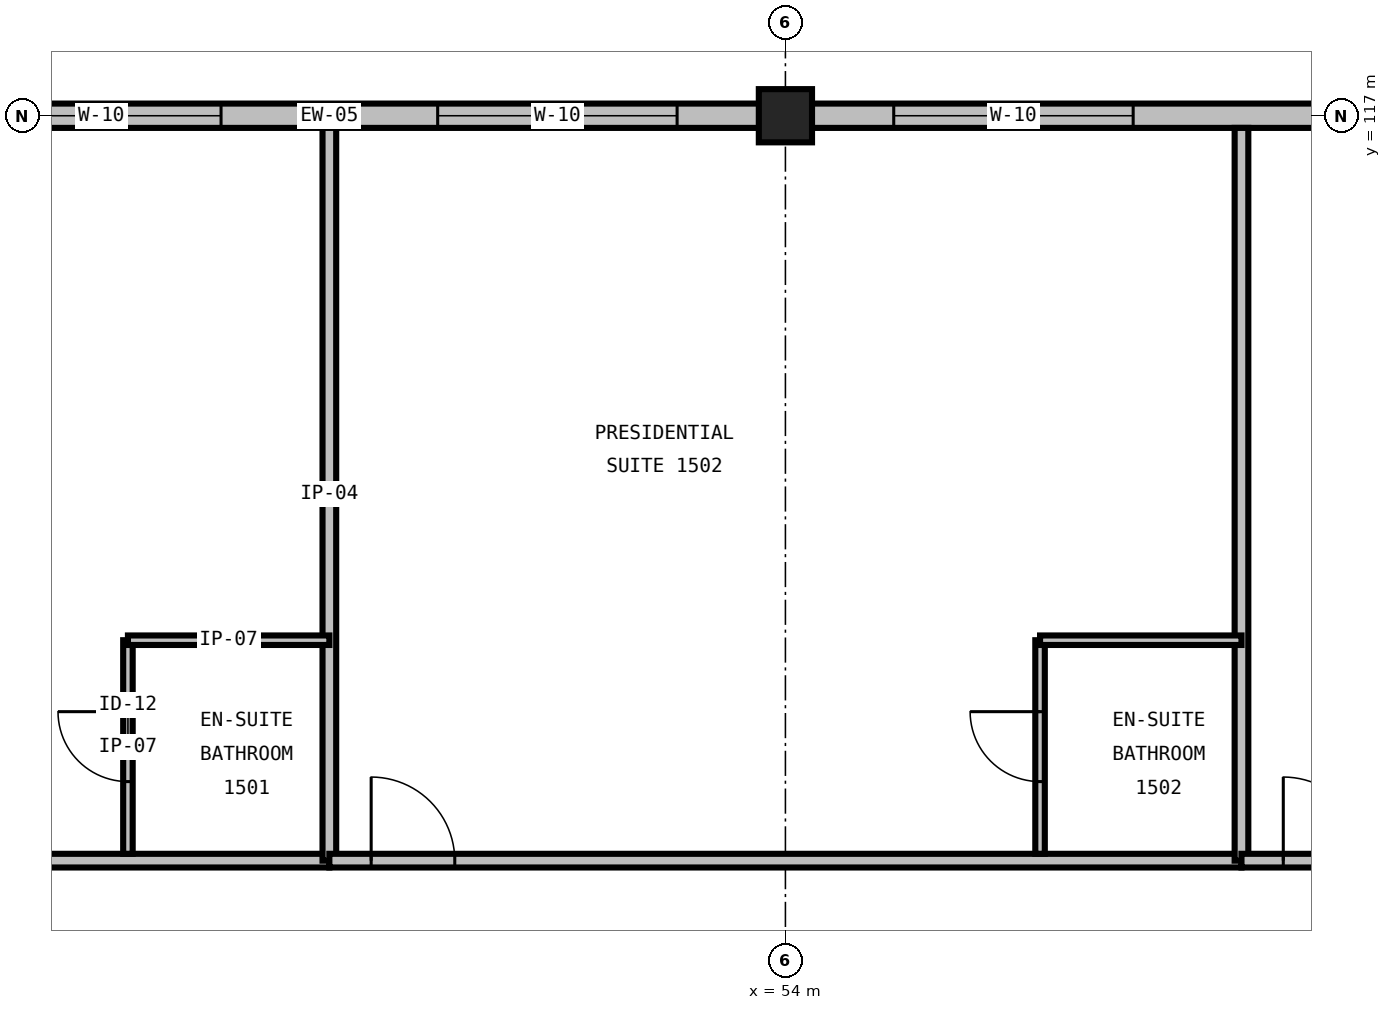
"""IFC4 building model, lengths in metres.
Left out: names, types, materials, properties, quantities, classifications, styles, units other than length and angle.
Written with IfcOpenShell. Run it as: python <this file> out.ifc"""

import sys

from ifc_helpers import new_model, si_unit, direction, frame, frame_2d, origin, origin_2d, place, context, subcontext, project, spatial, rectangle, extrude, element, fill, save


model = new_model("IFC4")
c1 = context("Model", 3, precision=1e-05, world=origin(), true_north=direction((0.0, 1.0)))
c2 = subcontext(c1, "Body", "Model", "MODEL_VIEW")
j1 = project(units=[si_unit("LENGTHUNIT", "METRE"), si_unit("PLANEANGLEUNIT", "RADIAN")], contexts=[c1])
p1 = place(None, origin())
s1 = spatial("IfcSite", under=j1, at=p1, CompositionType="ELEMENT")
p2 = place(p1, origin())
s2 = spatial("IfcBuilding", under=s1, at=p2, CompositionType="ELEMENT")
p3 = place(p2, frame((0.0, 0.0, 63.6)))
s3 = spatial("IfcBuildingStorey", under=s2, at=p3, CompositionType="ELEMENT", Elevation=63.6)
p4 = place(p3, frame((54.0, 117.0, 0.0), z_axis=(0.0, 0.0, 1.0), x_axis=(1.0, 0.0, 0.0)))
e1 = element("IfcColumn", 1, at=p4, inside=s3, PredefinedType="COLUMN", context=c2, shape_type="SweptSolid", body=[
    extrude(rectangle(XDim=0.7, YDim=0.7, at=origin_2d()), origin(), (0.0, 0.0, 1.0), 3.6),
])
p5 = place(p3, frame((54.0, 117.0, 0.0), z_axis=(0.0, 0.0, 1.0), x_axis=(-1.0, 0.0, 0.0)))
e2 = element("IfcWall", 2, at=p5, inside=s3, PredefinedType="STANDARD", context=c2, shape_type="SweptSolid", body=[
    extrude(rectangle(XDim=12.0, YDim=0.32, at=frame_2d((6.0, 0.0))), origin(), (0.0, 0.0, 1.0), 2.536),
])
p6 = place(p5, frame((1.425, 0.0, 0.65)))
e3 = element("IfcOpeningElement", 3, at=p6, cuts=e2, PredefinedType="OPENING", context=c2, shape_type="SweptSolid", body=[
    extrude(rectangle(XDim=3.15, YDim=1.75, at=frame_2d((1.575, 0.875))), frame((0.0, 0.175, 0.0), z_axis=(0.0, -1.0, 0.0), x_axis=(1.0, 0.0, 0.0)), (0.0, 0.0, 1.0), 0.35),
])
p7 = place(p5, frame((7.425, 0.0, 0.65)))
e4 = element("IfcOpeningElement", 4, at=p7, cuts=e2, PredefinedType="OPENING", context=c2, shape_type="SweptSolid", body=[
    extrude(rectangle(XDim=3.15, YDim=1.75, at=frame_2d((1.575, 0.875))), frame((0.0, 0.175, 0.0), z_axis=(0.0, -1.0, 0.0), x_axis=(1.0, 0.0, 0.0)), (0.0, 0.0, 1.0), 0.35),
])
p8 = place(p3, frame((66.0, 117.0, 0.0), z_axis=(0.0, 0.0, 1.0), x_axis=(-1.0, 0.0, 0.0)))
e5 = element("IfcWall", 5, at=p8, inside=s3, PredefinedType="STANDARD", context=c2, shape_type="SweptSolid", body=[
    extrude(rectangle(XDim=12.0, YDim=0.32, at=frame_2d((6.0, 0.0))), origin(), (0.0, 0.0, 1.0), 2.536),
])
p9 = place(p8, frame((1.425, 0.0, 0.65)))
e6 = element("IfcOpeningElement", 6, at=p9, cuts=e5, PredefinedType="OPENING", context=c2, shape_type="SweptSolid", body=[
    extrude(rectangle(XDim=3.15, YDim=1.75, at=frame_2d((1.575, 0.875))), frame((0.0, 0.175, 0.0), z_axis=(0.0, -1.0, 0.0), x_axis=(1.0, 0.0, 0.0)), (0.0, 0.0, 1.0), 0.35),
])
p10 = place(p8, frame((7.425, 0.0, 0.65)))
e7 = element("IfcOpeningElement", 7, at=p10, cuts=e5, PredefinedType="OPENING", context=c2, shape_type="SweptSolid", body=[
    extrude(rectangle(XDim=3.15, YDim=1.75, at=frame_2d((1.575, 0.875))), frame((0.0, 0.175, 0.0), z_axis=(0.0, -1.0, 0.0), x_axis=(1.0, 0.0, 0.0)), (0.0, 0.0, 1.0), 0.35),
])
p11 = place(p3, frame((36.085, 107.2, 0.0), z_axis=(0.0, 0.0, 1.0), x_axis=(1.0, 0.0, 0.0)))
e8 = element("IfcWall", 8, at=p11, inside=s3, PredefinedType="PARTITIONING", context=c2, shape_type="SweptSolid", body=[
    extrude(rectangle(XDim=11.915, YDim=0.18, at=frame_2d((5.957, 0.0))), origin(), (0.0, 0.0, 1.0), 3.29),
])
p12 = place(p11, frame((0.55, 0.0, 0.0)))
e9 = element("IfcOpeningElement", 9, at=p12, cuts=e8, PredefinedType="OPENING", context=c2, shape_type="SweptSolid", body=[
    extrude(rectangle(XDim=1.1, YDim=2.2, at=frame_2d((0.55, 1.1))), frame((0.0, 0.105, 0.0), z_axis=(0.0, -1.0, 0.0), x_axis=(1.0, 0.0, 0.0)), (0.0, 0.0, 1.0), 0.21),
])
p13 = place(p3, frame((48.0, 107.2, 0.0), z_axis=(0.0, 0.0, 1.0), x_axis=(0.0, 1.0, 0.0)))
e10 = element("IfcWall", 10, at=p13, inside=s3, PredefinedType="PARTITIONING", context=c2, shape_type="SweptSolid", body=[
    extrude(rectangle(XDim=9.64, YDim=0.18, at=frame_2d((4.82, 0.0))), origin(), (0.0, 0.0, 1.0), 3.29),
])
p14 = place(p3, frame((45.35, 107.29, 0.0), z_axis=(0.0, 0.0, 1.0), x_axis=(0.0, 1.0, 0.0)))
e11 = element("IfcWall", 11, at=p14, inside=s3, PredefinedType="PARTITIONING", context=c2, shape_type="SweptSolid", body=[
    extrude(rectangle(XDim=2.81, YDim=0.125, at=frame_2d((1.405, 0.0))), origin(), (0.0, 0.0, 1.0), 3.29),
])
p15 = place(p14, frame((0.95, 0.0, 0.0)))
e12 = element("IfcOpeningElement", 12, at=p15, cuts=e11, PredefinedType="OPENING", context=c2, shape_type="SweptSolid", body=[
    extrude(rectangle(XDim=0.92, YDim=2.1, at=frame_2d((0.46, 1.05))), frame((0.0, 0.077, 0.0), z_axis=(0.0, -1.0, 0.0), x_axis=(1.0, 0.0, 0.0)), (0.0, 0.0, 1.0), 0.155),
])
p16 = place(p3, frame((45.35, 110.1, 0.0), z_axis=(0.0, 0.0, 1.0), x_axis=(1.0, 0.0, 0.0)))
e13 = element("IfcWall", 13, at=p16, inside=s3, PredefinedType="PARTITIONING", context=c2, shape_type="SweptSolid", body=[
    extrude(rectangle(XDim=2.65, YDim=0.125, at=frame_2d((1.325, 0.0))), origin(), (0.0, 0.0, 1.0), 3.29),
])
p17 = place(p3, frame((48.0, 107.2, 0.0), z_axis=(0.0, 0.0, 1.0), x_axis=(1.0, 0.0, 0.0)))
e14 = element("IfcWall", 14, at=p17, inside=s3, PredefinedType="PARTITIONING", context=c2, shape_type="SweptSolid", body=[
    extrude(rectangle(XDim=12.0, YDim=0.18, at=frame_2d((6.0, 0.0))), origin(), (0.0, 0.0, 1.0), 3.29),
])
p18 = place(p17, frame((0.55, 0.0, 0.0)))
e15 = element("IfcOpeningElement", 15, at=p18, cuts=e14, PredefinedType="OPENING", context=c2, shape_type="SweptSolid", body=[
    extrude(rectangle(XDim=1.1, YDim=2.2, at=frame_2d((0.55, 1.1))), frame((0.0, 0.105, 0.0), z_axis=(0.0, -1.0, 0.0), x_axis=(1.0, 0.0, 0.0)), (0.0, 0.0, 1.0), 0.21),
])
p19 = place(p3, frame((60.0, 107.2, 0.0), z_axis=(0.0, 0.0, 1.0), x_axis=(0.0, 1.0, 0.0)))
e16 = element("IfcWall", 16, at=p19, inside=s3, PredefinedType="PARTITIONING", context=c2, shape_type="SweptSolid", body=[
    extrude(rectangle(XDim=9.64, YDim=0.18, at=frame_2d((4.82, 0.0))), origin(), (0.0, 0.0, 1.0), 3.29),
])
p20 = place(p3, frame((57.35, 107.29, 0.0), z_axis=(0.0, 0.0, 1.0), x_axis=(0.0, 1.0, 0.0)))
e17 = element("IfcWall", 17, at=p20, inside=s3, PredefinedType="PARTITIONING", context=c2, shape_type="SweptSolid", body=[
    extrude(rectangle(XDim=2.81, YDim=0.125, at=frame_2d((1.405, 0.0))), origin(), (0.0, 0.0, 1.0), 3.29),
])
p21 = place(p20, frame((0.95, 0.0, 0.0)))
e18 = element("IfcOpeningElement", 18, at=p21, cuts=e17, PredefinedType="OPENING", context=c2, shape_type="SweptSolid", body=[
    extrude(rectangle(XDim=0.92, YDim=2.1, at=frame_2d((0.46, 1.05))), frame((0.0, 0.077, 0.0), z_axis=(0.0, -1.0, 0.0), x_axis=(1.0, 0.0, 0.0)), (0.0, 0.0, 1.0), 0.155),
])
p22 = place(p3, frame((57.35, 110.1, 0.0), z_axis=(0.0, 0.0, 1.0), x_axis=(1.0, 0.0, 0.0)))
e19 = element("IfcWall", 19, at=p22, inside=s3, PredefinedType="PARTITIONING", context=c2, shape_type="SweptSolid", body=[
    extrude(rectangle(XDim=2.65, YDim=0.125, at=frame_2d((1.325, 0.0))), origin(), (0.0, 0.0, 1.0), 3.29),
])
p23 = place(p3, frame((60.0, 107.2, 0.0), z_axis=(0.0, 0.0, 1.0), x_axis=(1.0, 0.0, 0.0)))
e20 = element("IfcWall", 20, at=p23, inside=s3, PredefinedType="PARTITIONING", context=c2, shape_type="SweptSolid", body=[
    extrude(rectangle(XDim=12.0, YDim=0.18, at=frame_2d((6.0, 0.0))), origin(), (0.0, 0.0, 1.0), 3.29),
])
p24 = place(p23, frame((0.55, 0.0, 0.0)))
e21 = element("IfcOpeningElement", 21, at=p24, cuts=e20, PredefinedType="OPENING", context=c2, shape_type="SweptSolid", body=[
    extrude(rectangle(XDim=1.1, YDim=2.2, at=frame_2d((0.55, 1.1))), frame((0.0, 0.105, 0.0), z_axis=(0.0, -1.0, 0.0), x_axis=(1.0, 0.0, 0.0)), (0.0, 0.0, 1.0), 0.21),
])
p25 = place(p6, origin())
e22 = element("IfcWindow", 22, at=p25, inside=s3, PartitioningType="TRIPLE_PANEL_VERTICAL", PredefinedType="WINDOW", context=c2, shape_type="SweptSolid", body=[
    extrude(rectangle(XDim=3.15, YDim=1.75, at=frame_2d((1.575, 0.875))), frame((0.0, 0.03, 0.0), z_axis=(0.0, -1.0, 0.0), x_axis=(1.0, 0.0, 0.0)), (0.0, 0.0, 1.0), 0.06),
])
fill(e3, e22)
p26 = place(p7, origin())
e23 = element("IfcWindow", 23, at=p26, inside=s3, PartitioningType="TRIPLE_PANEL_VERTICAL", PredefinedType="WINDOW", context=c2, shape_type="SweptSolid", body=[
    extrude(rectangle(XDim=3.15, YDim=1.75, at=frame_2d((1.575, 0.875))), frame((0.0, 0.03, 0.0), z_axis=(0.0, -1.0, 0.0), x_axis=(1.0, 0.0, 0.0)), (0.0, 0.0, 1.0), 0.06),
])
fill(e4, e23)
p27 = place(p10, origin())
e24 = element("IfcWindow", 24, at=p27, inside=s3, PartitioningType="TRIPLE_PANEL_VERTICAL", PredefinedType="WINDOW", context=c2, shape_type="SweptSolid", body=[
    extrude(rectangle(XDim=3.15, YDim=1.75, at=frame_2d((1.575, 0.875))), frame((0.0, 0.03, 0.0), z_axis=(0.0, -1.0, 0.0), x_axis=(1.0, 0.0, 0.0)), (0.0, 0.0, 1.0), 0.06),
])
fill(e7, e24)
p28 = place(p15, origin())
e25 = element("IfcDoor", 25, at=p28, inside=s3, OperationType="SINGLE_SWING_RIGHT", PredefinedType="DOOR", context=c2, shape_type="SweptSolid", body=[
    extrude(rectangle(XDim=0.92, YDim=2.1, at=frame_2d((0.46, 1.05))), frame((0.0, 0.025, 0.0), z_axis=(0.0, -1.0, 0.0), x_axis=(1.0, 0.0, 0.0)), (0.0, 0.0, 1.0), 0.05),
])
fill(e12, e25)
p29 = place(p18, origin())
e26 = element("IfcDoor", 26, at=p29, inside=s3, OperationType="SINGLE_SWING_LEFT", PredefinedType="DOOR", context=c2, shape_type="SweptSolid", body=[
    extrude(rectangle(XDim=1.1, YDim=2.2, at=frame_2d((0.55, 1.1))), frame((0.0, 0.025, 0.0), z_axis=(0.0, -1.0, 0.0), x_axis=(1.0, 0.0, 0.0)), (0.0, 0.0, 1.0), 0.05),
])
fill(e15, e26)
p30 = place(p21, origin())
e27 = element("IfcDoor", 27, at=p30, inside=s3, OperationType="SINGLE_SWING_RIGHT", PredefinedType="DOOR", context=c2, shape_type="SweptSolid", body=[
    extrude(rectangle(XDim=0.92, YDim=2.1, at=frame_2d((0.46, 1.05))), frame((0.0, 0.025, 0.0), z_axis=(0.0, -1.0, 0.0), x_axis=(1.0, 0.0, 0.0)), (0.0, 0.0, 1.0), 0.05),
])
fill(e18, e27)
p31 = place(p24, origin())
e28 = element("IfcDoor", 28, at=p31, inside=s3, OperationType="SINGLE_SWING_LEFT", PredefinedType="DOOR", context=c2, shape_type="SweptSolid", body=[
    extrude(rectangle(XDim=1.1, YDim=2.2, at=frame_2d((0.55, 1.1))), frame((0.0, 0.025, 0.0), z_axis=(0.0, -1.0, 0.0), x_axis=(1.0, 0.0, 0.0)), (0.0, 0.0, 1.0), 0.05),
])
fill(e21, e28)
save(model, sys.argv[1])
